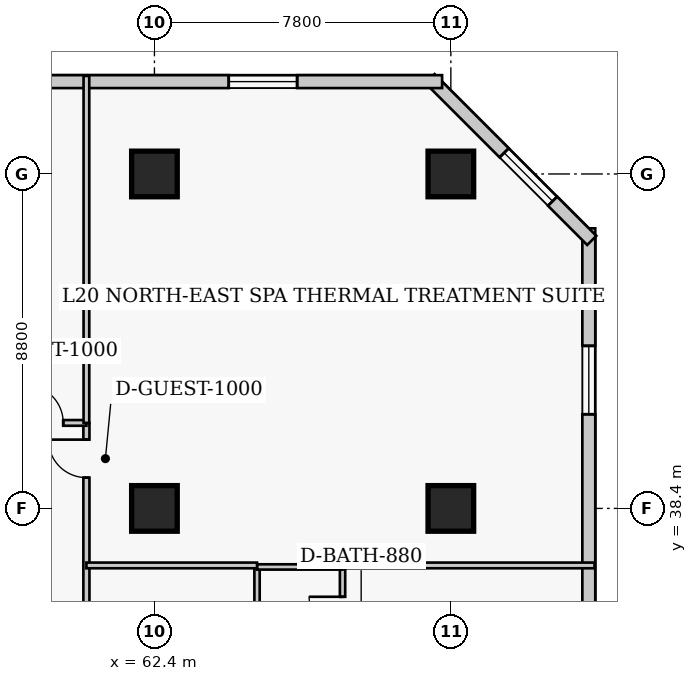
"""IFC4 building model, lengths in metres.
Left out: names, types, materials, properties, quantities, classifications, styles, units other than length and angle.
Written with IfcOpenShell. Run it as: python <this file> out.ifc"""

import sys

from ifc_helpers import new_model, si_unit, direction, frame, frame_2d, origin, origin_2d, place, context, subcontext, project, spatial, rectangle, extrude, element, fill, save


model = new_model("IFC4")
c1 = context("Model", 3, precision=1e-05, world=origin(), true_north=direction((0.0, 1.0)))
c2 = subcontext(c1, "Body", "Model", "MODEL_VIEW")
j1 = project(units=[si_unit("LENGTHUNIT", "METRE"), si_unit("PLANEANGLEUNIT", "RADIAN")], contexts=[c1])
p1 = place(None, origin())
s1 = spatial("IfcSite", under=j1, at=p1, CompositionType="ELEMENT")
p2 = place(p1, origin())
s2 = spatial("IfcBuilding", under=s1, at=p2, CompositionType="ELEMENT")
p3 = place(p2, frame((0.0, 0.0, 84.2)))
s3 = spatial("IfcBuildingStorey", under=s2, at=p3, CompositionType="ELEMENT", Elevation=84.2)
for number, where, z_axis, x_axis in (
    (1, (62.4, 38.4, 0.0), (0.0, 0.0, 1.0), (1.0, 0.0, 0.0)),
    (2, (62.4, 47.2, 0.0), (0.0, 0.0, 1.0), (1.0, 0.0, 0.0)),
    (3, (70.2, 38.4, 0.0), (0.0, 0.0, 1.0), (1.0, 0.0, 0.0)),
    (4, (70.2, 47.2, 0.0), (0.0, 0.0, 1.0), (1.0, 0.0, 0.0)),
):
    element("IfcColumn", number, at=place(p3, frame(where, z_axis=z_axis, x_axis=x_axis)), inside=s3, PredefinedType="COLUMN", context=c2, shape_type="SweptSolid", body=[
        extrude(rectangle(XDim=1.2, YDim=1.2, at=origin_2d()), origin(), (0.0, 0.0, 1.0), 3.8),
    ])
p4 = place(p3, frame((73.83, 13.83, 0.0), z_axis=(0.0, 0.0, 1.0), x_axis=(0.0, 1.0, 0.0)))
e5 = element("IfcWall", 5, at=p4, inside=s3, PredefinedType="SOLIDWALL", context=c2, shape_type="SweptSolid", body=[
    extrude(rectangle(XDim=31.94, YDim=0.34, at=frame_2d((15.97, 0.0))), origin(), (0.0, 0.0, 1.0), 3.54),
])
p5 = place(p4, frame((3.093, 0.0, 0.85)))
e6 = element("IfcOpeningElement", 6, at=p5, cuts=e5, PredefinedType="OPENING", context=c2, shape_type="SweptSolid", body=[
    extrude(rectangle(XDim=1.8, YDim=1.8, at=frame_2d((0.9, 0.9))), frame((0.0, 0.18, 0.0), z_axis=(0.0, -1.0, 0.0), x_axis=(1.0, 0.0, 0.0)), (0.0, 0.0, 1.0), 0.36),
])
p6 = place(p4, frame((11.077, 0.0, 0.85)))
e7 = element("IfcOpeningElement", 7, at=p6, cuts=e5, PredefinedType="OPENING", context=c2, shape_type="SweptSolid", body=[
    extrude(rectangle(XDim=1.8, YDim=1.8, at=frame_2d((0.9, 0.9))), frame((0.0, 0.18, 0.0), z_axis=(0.0, -1.0, 0.0), x_axis=(1.0, 0.0, 0.0)), (0.0, 0.0, 1.0), 0.36),
])
p7 = place(p4, frame((19.062, 0.0, 0.85)))
e8 = element("IfcOpeningElement", 8, at=p7, cuts=e5, PredefinedType="OPENING", context=c2, shape_type="SweptSolid", body=[
    extrude(rectangle(XDim=1.8, YDim=1.8, at=frame_2d((0.9, 0.9))), frame((0.0, 0.18, 0.0), z_axis=(0.0, -1.0, 0.0), x_axis=(1.0, 0.0, 0.0)), (0.0, 0.0, 1.0), 0.36),
])
p8 = place(p4, frame((27.048, 0.0, 0.85)))
e9 = element("IfcOpeningElement", 9, at=p8, cuts=e5, PredefinedType="OPENING", context=c2, shape_type="SweptSolid", body=[
    extrude(rectangle(XDim=1.8, YDim=1.8, at=frame_2d((0.9, 0.9))), frame((0.0, 0.18, 0.0), z_axis=(0.0, -1.0, 0.0), x_axis=(1.0, 0.0, 0.0)), (0.0, 0.0, 1.0), 0.36),
])
p9 = place(p3, frame((73.908, 45.451, 0.0), z_axis=(0.0, 0.0, 1.0), x_axis=(-0.707106781187, 0.707106781187, 0.0)))
e10 = element("IfcWall", 10, at=p9, inside=s3, PredefinedType="SOLIDWALL", context=c2, shape_type="SweptSolid", body=[
    extrude(rectangle(XDim=6.02, YDim=0.34, at=frame_2d((3.01, 0.0))), origin(), (0.0, 0.0, 1.0), 3.54),
])
p10 = place(p9, frame((1.46, 0.0, 0.85)))
e11 = element("IfcOpeningElement", 11, at=p10, cuts=e10, PredefinedType="OPENING", context=c2, shape_type="SweptSolid", body=[
    extrude(rectangle(XDim=1.8, YDim=1.8, at=frame_2d((0.9, 0.9))), frame((0.0, 0.18, 0.0), z_axis=(0.0, -1.0, 0.0), x_axis=(1.0, 0.0, 0.0)), (0.0, 0.0, 1.0), 0.36),
])
p11 = place(p3, frame((69.97, 49.63, 0.0), z_axis=(0.0, 0.0, 1.0), x_axis=(-1.0, 0.0, 0.0)))
e12 = element("IfcWall", 12, at=p11, inside=s3, PredefinedType="SOLIDWALL", context=c2, shape_type="SweptSolid", body=[
    extrude(rectangle(XDim=28.29, YDim=0.34, at=frame_2d((14.145, 0.0))), origin(), (0.0, 0.0, 1.0), 3.54),
])
p12 = place(p11, frame((3.815, 0.0, 0.85)))
e13 = element("IfcOpeningElement", 13, at=p12, cuts=e12, PredefinedType="OPENING", context=c2, shape_type="SweptSolid", body=[
    extrude(rectangle(XDim=1.8, YDim=1.8, at=frame_2d((0.9, 0.9))), frame((0.0, 0.18, 0.0), z_axis=(0.0, -1.0, 0.0), x_axis=(1.0, 0.0, 0.0)), (0.0, 0.0, 1.0), 0.36),
])
p13 = place(p11, frame((13.245, 0.0, 0.85)))
e14 = element("IfcOpeningElement", 14, at=p13, cuts=e12, PredefinedType="OPENING", context=c2, shape_type="SweptSolid", body=[
    extrude(rectangle(XDim=1.8, YDim=1.8, at=frame_2d((0.9, 0.9))), frame((0.0, 0.18, 0.0), z_axis=(0.0, -1.0, 0.0), x_axis=(1.0, 0.0, 0.0)), (0.0, 0.0, 1.0), 0.36),
])
p14 = place(p11, frame((22.675, 0.0, 0.85)))
e15 = element("IfcOpeningElement", 15, at=p14, cuts=e12, PredefinedType="OPENING", context=c2, shape_type="SweptSolid", body=[
    extrude(rectangle(XDim=1.8, YDim=1.8, at=frame_2d((0.9, 0.9))), frame((0.0, 0.18, 0.0), z_axis=(0.0, -1.0, 0.0), x_axis=(1.0, 0.0, 0.0)), (0.0, 0.0, 1.0), 0.36),
])
p15 = place(p3, frame((60.61, 11.85, 0.0), z_axis=(0.0, 0.0, 1.0), x_axis=(0.0, 1.0, 0.0)))
e16 = element("IfcWall", 16, at=p15, inside=s3, PredefinedType="PARTITIONING", context=c2, shape_type="SweptSolid", body=[
    extrude(rectangle(XDim=28.8, YDim=0.16, at=frame_2d((14.4, 0.0))), origin(), (0.0, 0.0, 1.0), 3.54),
])
p16 = place(p15, frame((3.6, 0.0, 0.0)))
e17 = element("IfcOpeningElement", 17, at=p16, cuts=e16, PredefinedType="OPENING", context=c2, shape_type="SweptSolid", body=[
    extrude(rectangle(XDim=0.95, YDim=2.1, at=frame_2d((0.475, 1.05))), frame((0.0, 0.09, 0.0), z_axis=(0.0, -1.0, 0.0), x_axis=(1.0, 0.0, 0.0)), (0.0, 0.0, 1.0), 0.18),
])
p17 = place(p15, frame((12.075, 0.0, 0.0)))
e18 = element("IfcOpeningElement", 18, at=p17, cuts=e16, PredefinedType="OPENING", context=c2, shape_type="SweptSolid", body=[
    extrude(rectangle(XDim=0.95, YDim=2.1, at=frame_2d((0.475, 1.05))), frame((0.0, 0.09, 0.0), z_axis=(0.0, -1.0, 0.0), x_axis=(1.0, 0.0, 0.0)), (0.0, 0.0, 1.0), 0.18),
])
p18 = place(p15, frame((20.525, 0.0, 0.0)))
e19 = element("IfcOpeningElement", 19, at=p18, cuts=e16, PredefinedType="OPENING", context=c2, shape_type="SweptSolid", body=[
    extrude(rectangle(XDim=0.95, YDim=2.1, at=frame_2d((0.475, 1.05))), frame((0.0, 0.09, 0.0), z_axis=(0.0, -1.0, 0.0), x_axis=(1.0, 0.0, 0.0)), (0.0, 0.0, 1.0), 0.18),
])
p19 = place(p15, frame((27.36, 0.0, 0.0)))
e20 = element("IfcOpeningElement", 20, at=p19, cuts=e16, PredefinedType="OPENING", context=c2, shape_type="SweptSolid", body=[
    extrude(rectangle(XDim=1.0, YDim=2.15, at=frame_2d((0.5, 1.075))), frame((0.0, 0.09, 0.0), z_axis=(0.0, -1.0, 0.0), x_axis=(1.0, 0.0, 0.0)), (0.0, 0.0, 1.0), 0.18),
])
p20 = place(p3, frame((56.8, 40.65, 0.0), z_axis=(0.0, 0.0, 1.0), x_axis=(1.0, 0.0, 0.0)))
e21 = element("IfcWall", 21, at=p20, inside=s3, PredefinedType="PARTITIONING", context=c2, shape_type="SweptSolid", body=[
    extrude(rectangle(XDim=3.81, YDim=0.15, at=frame_2d((1.905, 0.0))), origin(), (0.0, 0.0, 1.0), 3.54),
])
p21 = place(p20, frame((2.2, 0.0, 0.0)))
e22 = element("IfcOpeningElement", 22, at=p21, cuts=e21, PredefinedType="OPENING", context=c2, shape_type="SweptSolid", body=[
    extrude(rectangle(XDim=1.0, YDim=2.15, at=frame_2d((0.5, 1.075))), frame((0.0, 0.085, 0.0), z_axis=(0.0, -1.0, 0.0), x_axis=(1.0, 0.0, 0.0)), (0.0, 0.0, 1.0), 0.17),
])
p22 = place(p3, frame((60.61, 40.65, 0.0), z_axis=(0.0, 0.0, 1.0), x_axis=(0.0, 1.0, 0.0)))
e23 = element("IfcWall", 23, at=p22, inside=s3, PredefinedType="PARTITIONING", context=c2, shape_type="SweptSolid", body=[
    extrude(rectangle(XDim=9.13, YDim=0.15, at=frame_2d((4.565, 0.0))), origin(), (0.0, 0.0, 1.0), 3.54),
])
p23 = place(p3, frame((65.1, 34.41, 0.0), z_axis=(0.0, 0.0, 1.0), x_axis=(0.0, 1.0, 0.0)))
e24 = element("IfcWall", 24, at=p23, inside=s3, PredefinedType="PLUMBINGWALL", context=c2, shape_type="SweptSolid", body=[
    extrude(rectangle(XDim=2.45, YDim=0.14, at=frame_2d((1.225, 0.0))), origin(), (0.0, 0.0, 1.0), 3.54),
])
p24 = place(p3, frame((67.35, 34.41, 0.0), z_axis=(0.0, 0.0, 1.0), x_axis=(0.0, 1.0, 0.0)))
e25 = element("IfcWall", 25, at=p24, inside=s3, PredefinedType="PLUMBINGWALL", context=c2, shape_type="SweptSolid", body=[
    extrude(rectangle(XDim=2.45, YDim=0.14, at=frame_2d((1.225, 0.0))), origin(), (0.0, 0.0, 1.0), 3.54),
])
p25 = place(p24, frame((0.785, 0.0, 0.0)))
e26 = element("IfcOpeningElement", 26, at=p25, cuts=e25, PredefinedType="OPENING", context=c2, shape_type="SweptSolid", body=[
    extrude(rectangle(XDim=0.88, YDim=2.05, at=frame_2d((0.44, 1.025))), frame((0.0, 0.08, 0.0), z_axis=(0.0, -1.0, 0.0), x_axis=(1.0, 0.0, 0.0)), (0.0, 0.0, 1.0), 0.16),
])
p26 = place(p3, frame((65.1, 36.86, 0.0), z_axis=(0.0, 0.0, 1.0), x_axis=(1.0, 0.0, 0.0)))
e27 = element("IfcWall", 27, at=p26, inside=s3, PredefinedType="PLUMBINGWALL", context=c2, shape_type="SweptSolid", body=[
    extrude(rectangle(XDim=2.25, YDim=0.14, at=frame_2d((1.125, 0.0))), origin(), (0.0, 0.0, 1.0), 3.54),
])
p27 = place(p3, frame((60.61, 36.9, 0.0), z_axis=(0.0, 0.0, 1.0), x_axis=(1.0, 0.0, 0.0)))
e28 = element("IfcWall", 28, at=p27, inside=s3, PredefinedType="PARTITIONING", context=c2, shape_type="SweptSolid", body=[
    extrude(rectangle(XDim=4.49, YDim=0.15, at=frame_2d((2.245, 0.0))), origin(), (0.0, 0.0, 1.0), 3.54),
])
p28 = place(p3, frame((67.35, 36.9, 0.0), z_axis=(0.0, 0.0, 1.0), x_axis=(1.0, 0.0, 0.0)))
e29 = element("IfcWall", 29, at=p28, inside=s3, PredefinedType="PARTITIONING", context=c2, shape_type="SweptSolid", body=[
    extrude(rectangle(XDim=6.63, YDim=0.15, at=frame_2d((3.315, 0.0))), origin(), (0.0, 0.0, 1.0), 3.54),
])
p29 = place(p8, origin())
e30 = element("IfcWindow", 30, at=p29, inside=s3, PartitioningType="SINGLE_PANEL", PredefinedType="WINDOW", context=c2, shape_type="SweptSolid", body=[
    extrude(rectangle(XDim=1.8, YDim=1.8, at=frame_2d((0.9, 0.9))), frame((0.0, 0.03, 0.0), z_axis=(0.0, -1.0, 0.0), x_axis=(1.0, 0.0, 0.0)), (0.0, 0.0, 1.0), 0.06),
])
fill(e9, e30)
p30 = place(p10, origin())
e31 = element("IfcWindow", 31, at=p30, inside=s3, PartitioningType="SINGLE_PANEL", PredefinedType="WINDOW", context=c2, shape_type="SweptSolid", body=[
    extrude(rectangle(XDim=1.8, YDim=1.8, at=frame_2d((0.9, 0.9))), frame((0.0, 0.03, 0.0), z_axis=(0.0, -1.0, 0.0), x_axis=(1.0, 0.0, 0.0)), (0.0, 0.0, 1.0), 0.06),
])
fill(e11, e31)
p31 = place(p12, origin())
e32 = element("IfcWindow", 32, at=p31, inside=s3, PartitioningType="SINGLE_PANEL", PredefinedType="WINDOW", context=c2, shape_type="SweptSolid", body=[
    extrude(rectangle(XDim=1.8, YDim=1.8, at=frame_2d((0.9, 0.9))), frame((0.0, 0.03, 0.0), z_axis=(0.0, -1.0, 0.0), x_axis=(1.0, 0.0, 0.0)), (0.0, 0.0, 1.0), 0.06),
])
fill(e13, e32)
p32 = place(p21, origin())
e33 = element("IfcDoor", 33, at=p32, inside=s3, OperationType="SINGLE_SWING_LEFT", PredefinedType="DOOR", context=c2, shape_type="SweptSolid", body=[
    extrude(rectangle(XDim=1.0, YDim=2.15, at=frame_2d((0.5, 1.075))), frame((0.0, 0.025, 0.0), z_axis=(0.0, -1.0, 0.0), x_axis=(1.0, 0.0, 0.0)), (0.0, 0.0, 1.0), 0.05),
])
fill(e22, e33)
p33 = place(p25, origin())
e34 = element("IfcDoor", 34, at=p33, inside=s3, OperationType="SINGLE_SWING_RIGHT", PredefinedType="DOOR", context=c2, shape_type="SweptSolid", body=[
    extrude(rectangle(XDim=0.88, YDim=2.05, at=frame_2d((0.44, 1.025))), frame((0.0, 0.025, 0.0), z_axis=(0.0, -1.0, 0.0), x_axis=(1.0, 0.0, 0.0)), (0.0, 0.0, 1.0), 0.05),
])
fill(e26, e34)
p34 = place(p19, origin())
e35 = element("IfcDoor", 35, at=p34, inside=s3, OperationType="SINGLE_SWING_RIGHT", PredefinedType="DOOR", context=c2, shape_type="SweptSolid", body=[
    extrude(rectangle(XDim=1.0, YDim=2.15, at=frame_2d((0.5, 1.075))), frame((0.0, 0.025, 0.0), z_axis=(0.0, -1.0, 0.0), x_axis=(1.0, 0.0, 0.0)), (0.0, 0.0, 1.0), 0.05),
])
fill(e20, e35)
save(model, sys.argv[1])
